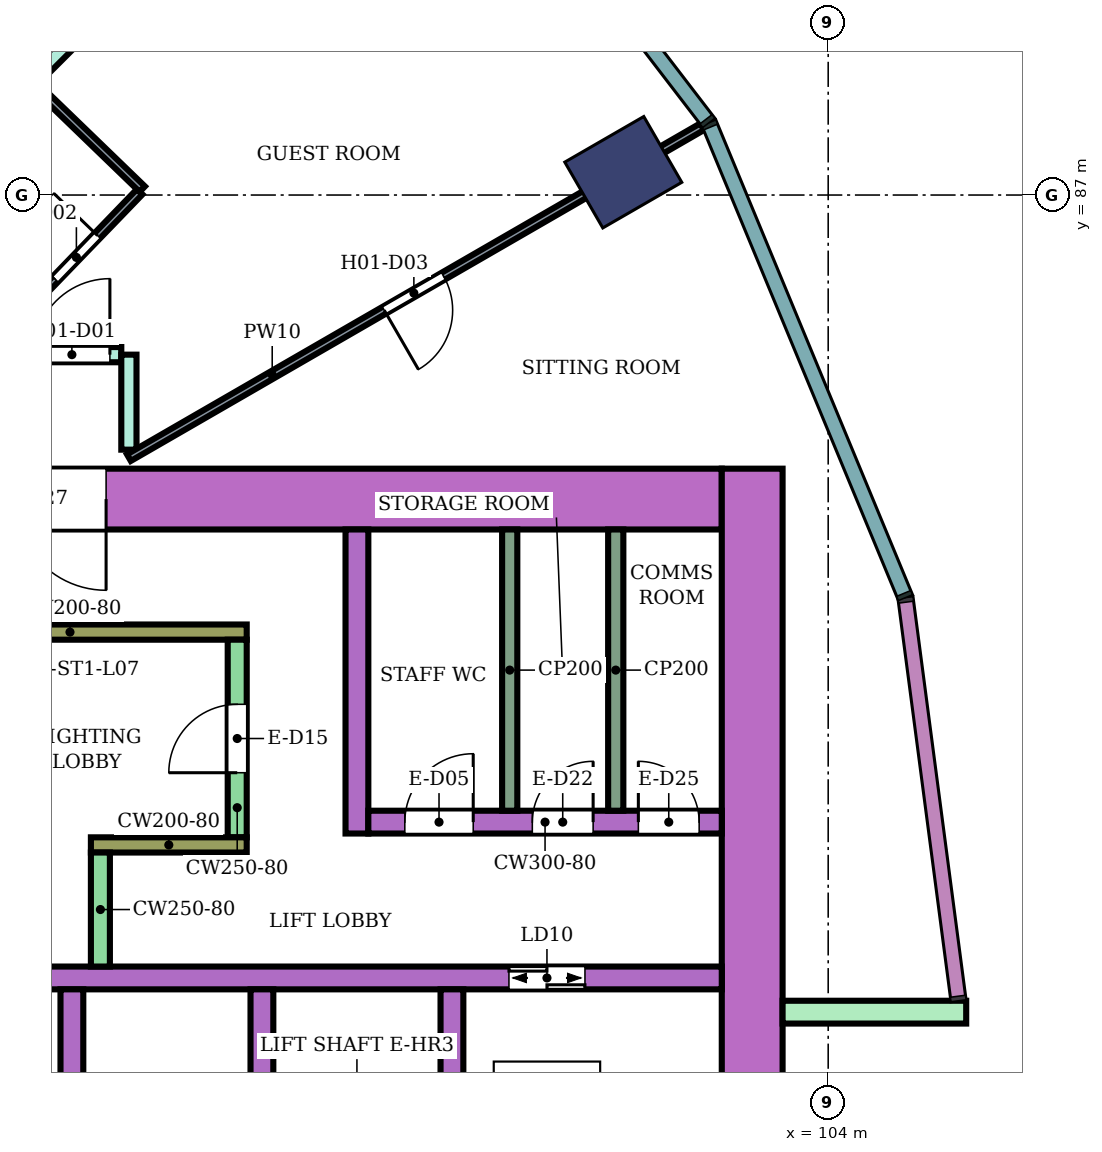
"""IFC4 building model, lengths in metres.
Left out: names, types, materials, properties, quantities, classifications, styles, units other than length and angle.
Written with IfcOpenShell. Run it as: python <this file> out.ifc"""

import sys

from ifc_helpers import new_model, si_unit, direction, frame, frame_2d, origin, origin_2d, place, context, subcontext, project, spatial, rectangle, extrude, element, fill, save


model = new_model("IFC4")
c1 = context("Model", 3, precision=1e-05, world=origin(), true_north=direction((0.0, 1.0)))
c2 = subcontext(c1, "Body", "Model", "MODEL_VIEW")
j1 = project(units=[si_unit("LENGTHUNIT", "METRE"), si_unit("PLANEANGLEUNIT", "RADIAN")], contexts=[c1])
p1 = place(None, origin())
s1 = spatial("IfcSite", under=j1, at=p1, CompositionType="ELEMENT")
p2 = place(p1, origin())
s2 = spatial("IfcBuilding", under=s1, at=p2, CompositionType="ELEMENT")
p3 = place(p2, frame((0.0, 0.0, 36.4)))
s3 = spatial("IfcBuildingStorey", under=s2, at=p3, CompositionType="ELEMENT", Elevation=36.4)
p4 = place(p3, frame((101.304, 87.3, 0.0), z_axis=(0.0, 0.0, 1.0), x_axis=(0.866025403784, 0.5, 0.0)))
e1 = element("IfcColumn", 1, at=p4, inside=s3, PredefinedType="COLUMN", context=c2, shape_type="SweptSolid", body=[
    extrude(rectangle(XDim=1.2, YDim=1.0, at=origin_2d()), origin(), (0.0, 0.0, 1.0), 3.8),
])
p5 = place(p3, frame((87.9, 83.0, 0.0), z_axis=(0.0, 0.0, 1.0), x_axis=(1.0, 0.0, 0.0)))
e2 = element("IfcWall", 2, at=p5, inside=s3, PredefinedType="SHEAR", context=c2, shape_type="SweptSolid", body=[
    extrude(rectangle(XDim=14.7, YDim=0.8, at=frame_2d((7.35, 0.0))), origin(), (0.0, 0.0, 1.0), 3.48),
])
p6 = place(p5, frame((4.2, 0.0, 0.0)))
e3 = element("IfcOpeningElement", 3, at=p6, cuts=e2, PredefinedType="OPENING", context=c2, shape_type="SweptSolid", body=[
    extrude(rectangle(XDim=2.4, YDim=2.4, at=frame_2d((1.2, 1.2))), frame((0.0, 0.41, 0.0), z_axis=(0.0, -1.0, 0.0), x_axis=(1.0, 0.0, 0.0)), (0.0, 0.0, 1.0), 0.82),
])
p7 = place(p3, frame((103.0, 66.6, 0.0), z_axis=(0.0, 0.0, 1.0), x_axis=(0.0, 1.0, 0.0)))
e4 = element("IfcWall", 4, at=p7, inside=s3, PredefinedType="SHEAR", context=c2, shape_type="SweptSolid", body=[
    extrude(rectangle(XDim=16.8, YDim=0.8, at=frame_2d((8.4, 0.0))), origin(), (0.0, 0.0, 1.0), 3.48),
])
p8 = place(p3, frame((91.7, 76.7, 0.0), z_axis=(0.0, 0.0, 1.0), x_axis=(1.0, 0.0, 0.0)))
e5 = element("IfcWall", 5, at=p8, inside=s3, PredefinedType="SHEAR", context=c2, shape_type="SweptSolid", body=[
    extrude(rectangle(XDim=10.9, YDim=0.3, at=frame_2d((5.45, 0.0))), origin(), (0.0, 0.0, 1.0), 3.48),
])
p9 = place(p8, frame((0.55, 0.0, 0.0)))
e6 = element("IfcOpeningElement", 6, at=p9, cuts=e5, PredefinedType="OPENING", context=c2, shape_type="SweptSolid", body=[
    extrude(rectangle(XDim=1.1, YDim=2.1, at=frame_2d((0.55, 1.05))), frame((0.0, 0.16, 0.0), z_axis=(0.0, -1.0, 0.0), x_axis=(1.0, 0.0, 0.0)), (0.0, 0.0, 1.0), 0.32),
])
p10 = place(p8, frame((8.1, 0.0, 0.0)))
e7 = element("IfcOpeningElement", 7, at=p10, cuts=e5, PredefinedType="OPENING", context=c2, shape_type="SweptSolid", body=[
    extrude(rectangle(XDim=1.0, YDim=2.1, at=frame_2d((0.5, 1.05))), frame((0.0, 0.16, 0.0), z_axis=(0.0, -1.0, 0.0), x_axis=(1.0, 0.0, 0.0)), (0.0, 0.0, 1.0), 0.32),
])
for number, where, z_axis, x_axis in (
    (8, (94.05, 74.0, 0.0), (0.0, 0.0, 1.0), (0.0, 1.0, 0.0)),
    (9, (96.55, 74.0, 0.0), (0.0, 0.0, 1.0), (0.0, 1.0, 0.0)),
    (10, (99.05, 74.0, 0.0), (0.0, 0.0, 1.0), (0.0, 1.0, 0.0)),
):
    element("IfcWall", number, at=place(p3, frame(where, z_axis=z_axis, x_axis=x_axis)), inside=s3, PredefinedType="SHEAR", context=c2, shape_type="SweptSolid", body=[
        extrude(rectangle(XDim=2.55, YDim=0.3, at=frame_2d((1.275, 0.0))), origin(), (0.0, 0.0, 1.0), 3.48),
    ])
p11 = place(p3, frame((91.7, 81.25, 0.0), z_axis=(0.0, 0.0, 1.0), x_axis=(1.0, 0.0, 0.0)))
e11 = element("IfcWall", 11, at=p11, inside=s3, PredefinedType="SHEAR", context=c2, shape_type="SweptSolid", body=[
    extrude(rectangle(XDim=4.65, YDim=0.2, at=frame_2d((2.325, 0.0))), origin(), (0.0, 0.0, 1.0), 3.48),
])
p12 = place(p3, frame((96.225, 78.55, 0.0), z_axis=(0.0, 0.0, 1.0), x_axis=(0.0, 1.0, 0.0)))
e12 = element("IfcWall", 12, at=p12, inside=s3, PredefinedType="SHEAR", context=c2, shape_type="SweptSolid", body=[
    extrude(rectangle(XDim=2.6, YDim=0.25, at=frame_2d((1.3, 0.0))), origin(), (0.0, 0.0, 1.0), 3.48),
])
p13 = place(p12, frame((0.85, 0.0, 0.0)))
e13 = element("IfcOpeningElement", 13, at=p13, cuts=e12, PredefinedType="OPENING", context=c2, shape_type="SweptSolid", body=[
    extrude(rectangle(XDim=0.9, YDim=2.1, at=frame_2d((0.45, 1.05))), frame((0.0, 0.135, 0.0), z_axis=(0.0, -1.0, 0.0), x_axis=(1.0, 0.0, 0.0)), (0.0, 0.0, 1.0), 0.27),
])
p14 = place(p3, frame((94.3, 78.45, 0.0), z_axis=(0.0, 0.0, 1.0), x_axis=(1.0, 0.0, 0.0)))
e14 = element("IfcWall", 14, at=p14, inside=s3, PredefinedType="SHEAR", context=c2, shape_type="SweptSolid", body=[
    extrude(rectangle(XDim=2.05, YDim=0.2, at=frame_2d((1.025, 0.0))), origin(), (0.0, 0.0, 1.0), 3.48),
])
p15 = place(p3, frame((94.425, 76.85, 0.0), z_axis=(0.0, 0.0, 1.0), x_axis=(0.0, 1.0, 0.0)))
e15 = element("IfcWall", 15, at=p15, inside=s3, PredefinedType="SHEAR", context=c2, shape_type="SweptSolid", body=[
    extrude(rectangle(XDim=1.5, YDim=0.25, at=frame_2d((0.75, 0.0))), origin(), (0.0, 0.0, 1.0), 3.48),
])
p16 = place(p3, frame((97.8, 78.6, 0.0), z_axis=(0.0, 0.0, 1.0), x_axis=(0.0, 1.0, 0.0)))
e16 = element("IfcWall", 16, at=p16, inside=s3, PredefinedType="SHEAR", context=c2, shape_type="SweptSolid", body=[
    extrude(rectangle(XDim=4.0, YDim=0.3, at=frame_2d((2.0, 0.0))), origin(), (0.0, 0.0, 1.0), 3.48),
])
p17 = place(p3, frame((97.95, 78.75, 0.0), z_axis=(0.0, 0.0, 1.0), x_axis=(1.0, 0.0, 0.0)))
e17 = element("IfcWall", 17, at=p17, inside=s3, PredefinedType="SHEAR", context=c2, shape_type="SweptSolid", body=[
    extrude(rectangle(XDim=4.65, YDim=0.3, at=frame_2d((2.325, 0.0))), origin(), (0.0, 0.0, 1.0), 3.48),
])
p18 = place(p17, frame((0.48, 0.0, 0.0)))
e18 = element("IfcOpeningElement", 18, at=p18, cuts=e17, PredefinedType="OPENING", context=c2, shape_type="SweptSolid", body=[
    extrude(rectangle(XDim=0.9, YDim=2.1, at=frame_2d((0.45, 1.05))), frame((0.0, 0.16, 0.0), z_axis=(0.0, -1.0, 0.0), x_axis=(1.0, 0.0, 0.0)), (0.0, 0.0, 1.0), 0.32),
])
p19 = place(p17, frame((2.157, 0.0, 0.0)))
e19 = element("IfcOpeningElement", 19, at=p19, cuts=e17, PredefinedType="OPENING", context=c2, shape_type="SweptSolid", body=[
    extrude(rectangle(XDim=0.8, YDim=2.1, at=frame_2d((0.4, 1.05))), frame((0.0, 0.16, 0.0), z_axis=(0.0, -1.0, 0.0), x_axis=(1.0, 0.0, 0.0)), (0.0, 0.0, 1.0), 0.32),
])
p20 = place(p17, frame((3.552, 0.0, 0.0)))
e20 = element("IfcOpeningElement", 20, at=p20, cuts=e17, PredefinedType="OPENING", context=c2, shape_type="SweptSolid", body=[
    extrude(rectangle(XDim=0.8, YDim=2.1, at=frame_2d((0.4, 1.05))), frame((0.0, 0.16, 0.0), z_axis=(0.0, -1.0, 0.0), x_axis=(1.0, 0.0, 0.0)), (0.0, 0.0, 1.0), 0.32),
])
p21 = place(p3, frame((103.4, 76.25, 0.0), z_axis=(0.0, 0.0, 1.0), x_axis=(1.0, 0.0, 0.0)))
e21 = element("IfcWall", 21, at=p21, inside=s3, PredefinedType="NOTDEFINED", context=c2, shape_type="SweptSolid", body=[
    extrude(rectangle(XDim=2.416, YDim=0.3, at=frame_2d((1.208, 0.0))), origin(), (0.0, 0.0, 1.0), 3.8),
])
p22 = place(p3, frame((91.594, 86.591, 0.0), z_axis=(0.0, 0.0, 1.0), x_axis=(0.707214399597, 0.706999146394, 0.0)))
e22 = element("IfcWall", 22, at=p22, inside=s3, PredefinedType="PARTITIONING", context=c2, shape_type="SweptSolid", body=[
    extrude(rectangle(XDim=6.805, YDim=0.2, at=frame_2d((3.403, 0.0))), origin(), (0.0, 0.0, 1.0), 3.35),
])
p23 = place(p3, frame((93.203, 84.9, 0.0), z_axis=(0.0, 0.0, 1.0), x_axis=(1.0, 0.0, 0.0)))
e23 = element("IfcWall", 23, at=p23, inside=s3, PredefinedType="PARTITIONING", context=c2, shape_type="SweptSolid", body=[
    extrude(rectangle(XDim=1.497, YDim=0.2, at=frame_2d((0.749, 0.0))), origin(), (0.0, 0.0, 1.0), 3.35),
])
p24 = place(p23, frame((0.347, 0.0, 0.0)))
e24 = element("IfcOpeningElement", 24, at=p24, cuts=e23, PredefinedType="OPENING", context=c2, shape_type="SweptSolid", body=[
    extrude(rectangle(XDim=1.0, YDim=2.1, at=frame_2d((0.5, 1.05))), frame((0.0, 0.11, 0.0), z_axis=(0.0, -1.0, 0.0), x_axis=(1.0, 0.0, 0.0)), (0.0, 0.0, 1.0), 0.22),
])
p25 = place(p3, frame((94.8, 83.65, 0.0), z_axis=(0.0, 0.0, 1.0), x_axis=(0.0, 1.0, 0.0)))
e25 = element("IfcWall", 25, at=p25, inside=s3, PredefinedType="PARTITIONING", context=c2, shape_type="SweptSolid", body=[
    extrude(rectangle(XDim=1.25, YDim=0.2, at=frame_2d((0.625, 0.0))), origin(), (0.0, 0.0, 1.0), 3.35),
])
p26 = place(p3, frame((93.103, 85.136, 0.0), z_axis=(0.0, 0.0, 1.0), x_axis=(0.694324808789, 0.719661767708, 0.0)))
e26 = element("IfcWall", 26, at=p26, inside=s3, PredefinedType="PARTITIONING", context=c2, shape_type="SweptSolid", body=[
    extrude(rectangle(XDim=2.65, YDim=0.1, at=frame_2d((1.325, 0.0))), origin(), (0.0, 0.0, 1.0), 3.35),
])
p27 = place(p26, frame((1.05, 0.0, 0.0)))
e27 = element("IfcOpeningElement", 27, at=p27, cuts=e26, PredefinedType="OPENING", context=c2, shape_type="SweptSolid", body=[
    extrude(rectangle(XDim=0.8, YDim=2.1, at=frame_2d((0.4, 1.05))), frame((0.0, 0.06, 0.0), z_axis=(0.0, -1.0, 0.0), x_axis=(1.0, 0.0, 0.0)), (0.0, 0.0, 1.0), 0.12),
])
p28 = place(p3, frame((93.581, 88.425, 0.0), z_axis=(0.0, 0.0, 1.0), x_axis=(0.719336381931, -0.694661910307, 0.0)))
e28 = element("IfcWall", 28, at=p28, inside=s3, PredefinedType="PARTITIONING", context=c2, shape_type="SweptSolid", body=[
    extrude(rectangle(XDim=1.939, YDim=0.1, at=frame_2d((0.97, 0.0))), origin(), (0.0, 0.0, 1.0), 3.35),
])
p29 = place(p3, frame((94.8, 83.545, 0.0), z_axis=(0.0, 0.0, 1.0), x_axis=(0.86602264145, 0.500004784474, 0.0)))
e29 = element("IfcWall", 29, at=p29, inside=s3, PredefinedType="PARTITIONING", context=c2, shape_type="SweptSolid", body=[
    extrude(rectangle(XDim=8.708, YDim=0.1, at=frame_2d((4.354, 0.0))), origin(), (0.0, 0.0, 1.0), 3.35),
])
p30 = place(p29, frame((3.879, 0.0, 0.0)))
e30 = element("IfcOpeningElement", 30, at=p30, cuts=e29, PredefinedType="OPENING", context=c2, shape_type="SweptSolid", body=[
    extrude(rectangle(XDim=0.9, YDim=2.1, at=frame_2d((0.45, 1.05))), frame((0.0, 0.06, 0.0), z_axis=(0.0, -1.0, 0.0), x_axis=(1.0, 0.0, 0.0)), (0.0, 0.0, 1.0), 0.12),
])
for number, where, z_axis, x_axis in (
    (31, (99.81, 78.9, 0.0), (0.0, 0.0, 1.0), (0.0, 1.0, 0.0)),
    (32, (101.205, 78.9, 0.0), (0.0, 0.0, 1.0), (0.0, 1.0, 0.0)),
):
    element("IfcWall", number, at=place(p3, frame(where, z_axis=z_axis, x_axis=x_axis)), inside=s3, PredefinedType="PARTITIONING", context=c2, shape_type="SweptSolid", body=[
        extrude(rectangle(XDim=3.7, YDim=0.2, at=frame_2d((1.85, 0.0))), origin(), (0.0, 0.0, 1.0), 3.48),
    ])
p31 = place(p24, origin())
e33 = element("IfcDoor", 33, at=p31, inside=s3, OperationType="SINGLE_SWING_RIGHT", PredefinedType="DOOR", context=c2, shape_type="SweptSolid", body=[
    extrude(rectangle(XDim=1.0, YDim=2.1, at=frame_2d((0.5, 1.05))), frame((0.0, 0.025, 0.0), z_axis=(0.0, -1.0, 0.0), x_axis=(1.0, 0.0, 0.0)), (0.0, 0.0, 1.0), 0.05),
])
fill(e24, e33)
p32 = place(p27, origin())
e34 = element("IfcDoor", 34, at=p32, inside=s3, OperationType="SINGLE_SWING_RIGHT", PredefinedType="DOOR", context=c2, shape_type="SweptSolid", body=[
    extrude(rectangle(XDim=0.8, YDim=2.1, at=frame_2d((0.4, 1.05))), frame((0.0, 0.025, 0.0), z_axis=(0.0, -1.0, 0.0), x_axis=(1.0, 0.0, 0.0)), (0.0, 0.0, 1.0), 0.05),
])
fill(e27, e34)
p33 = place(p30, frame((0.9, 0.0, 0.0), z_axis=(0.0, 0.0, 1.0), x_axis=(-1.0, 0.0, 0.0)))
e35 = element("IfcDoor", 35, at=p33, inside=s3, OperationType="SINGLE_SWING_RIGHT", PredefinedType="DOOR", context=c2, shape_type="SweptSolid", body=[
    extrude(rectangle(XDim=0.9, YDim=2.1, at=frame_2d((0.45, 1.05))), frame((0.0, 0.025, 0.0), z_axis=(0.0, -1.0, 0.0), x_axis=(1.0, 0.0, 0.0)), (0.0, 0.0, 1.0), 0.05),
])
fill(e30, e35)
p34 = place(p10, origin())
e36 = element("IfcDoor", 36, at=p34, inside=s3, OperationType="DOUBLE_DOOR_SLIDING", PredefinedType="DOOR", context=c2, shape_type="SweptSolid", body=[
    extrude(rectangle(XDim=1.0, YDim=2.1, at=frame_2d((0.5, 1.05))), frame((0.0, 0.025, 0.0), z_axis=(0.0, -1.0, 0.0), x_axis=(1.0, 0.0, 0.0)), (0.0, 0.0, 1.0), 0.05),
])
fill(e7, e36)
p35 = place(p13, origin())
e37 = element("IfcDoor", 37, at=p35, inside=s3, OperationType="SINGLE_SWING_LEFT", PredefinedType="DOOR", context=c2, shape_type="SweptSolid", body=[
    extrude(rectangle(XDim=0.9, YDim=2.1, at=frame_2d((0.45, 1.05))), frame((0.0, 0.025, 0.0), z_axis=(0.0, -1.0, 0.0), x_axis=(1.0, 0.0, 0.0)), (0.0, 0.0, 1.0), 0.05),
])
fill(e13, e37)
p36 = place(p18, origin())
e38 = element("IfcDoor", 38, at=p36, inside=s3, OperationType="SINGLE_SWING_RIGHT", PredefinedType="DOOR", context=c2, shape_type="SweptSolid", body=[
    extrude(rectangle(XDim=0.9, YDim=2.1, at=frame_2d((0.45, 1.05))), frame((0.0, 0.025, 0.0), z_axis=(0.0, -1.0, 0.0), x_axis=(1.0, 0.0, 0.0)), (0.0, 0.0, 1.0), 0.05),
])
fill(e18, e38)
p37 = place(p19, origin())
e39 = element("IfcDoor", 39, at=p37, inside=s3, OperationType="SINGLE_SWING_RIGHT", PredefinedType="DOOR", context=c2, shape_type="SweptSolid", body=[
    extrude(rectangle(XDim=0.8, YDim=2.1, at=frame_2d((0.4, 1.05))), frame((0.0, 0.025, 0.0), z_axis=(0.0, -1.0, 0.0), x_axis=(1.0, 0.0, 0.0)), (0.0, 0.0, 1.0), 0.05),
])
fill(e19, e39)
p38 = place(p20, origin())
e40 = element("IfcDoor", 40, at=p38, inside=s3, OperationType="SINGLE_SWING_LEFT", PredefinedType="DOOR", context=c2, shape_type="SweptSolid", body=[
    extrude(rectangle(XDim=0.8, YDim=2.1, at=frame_2d((0.4, 1.05))), frame((0.0, 0.025, 0.0), z_axis=(0.0, -1.0, 0.0), x_axis=(1.0, 0.0, 0.0)), (0.0, 0.0, 1.0), 0.05),
])
fill(e20, e40)
p39 = place(p6, frame((2.4, 0.0, 0.0), z_axis=(0.0, 0.0, 1.0), x_axis=(-1.0, 0.0, 0.0)))
e41 = element("IfcDoor", 41, at=p39, inside=s3, OperationType="DOUBLE_DOOR_SINGLE_SWING", PredefinedType="DOOR", context=c2, shape_type="SweptSolid", body=[
    extrude(rectangle(XDim=2.4, YDim=2.4, at=frame_2d((1.2, 1.2))), frame((0.0, 0.025, 0.0), z_axis=(0.0, -1.0, 0.0), x_axis=(1.0, 0.0, 0.0)), (0.0, 0.0, 1.0), 0.05),
])
fill(e3, e41)
save(model, sys.argv[1])
